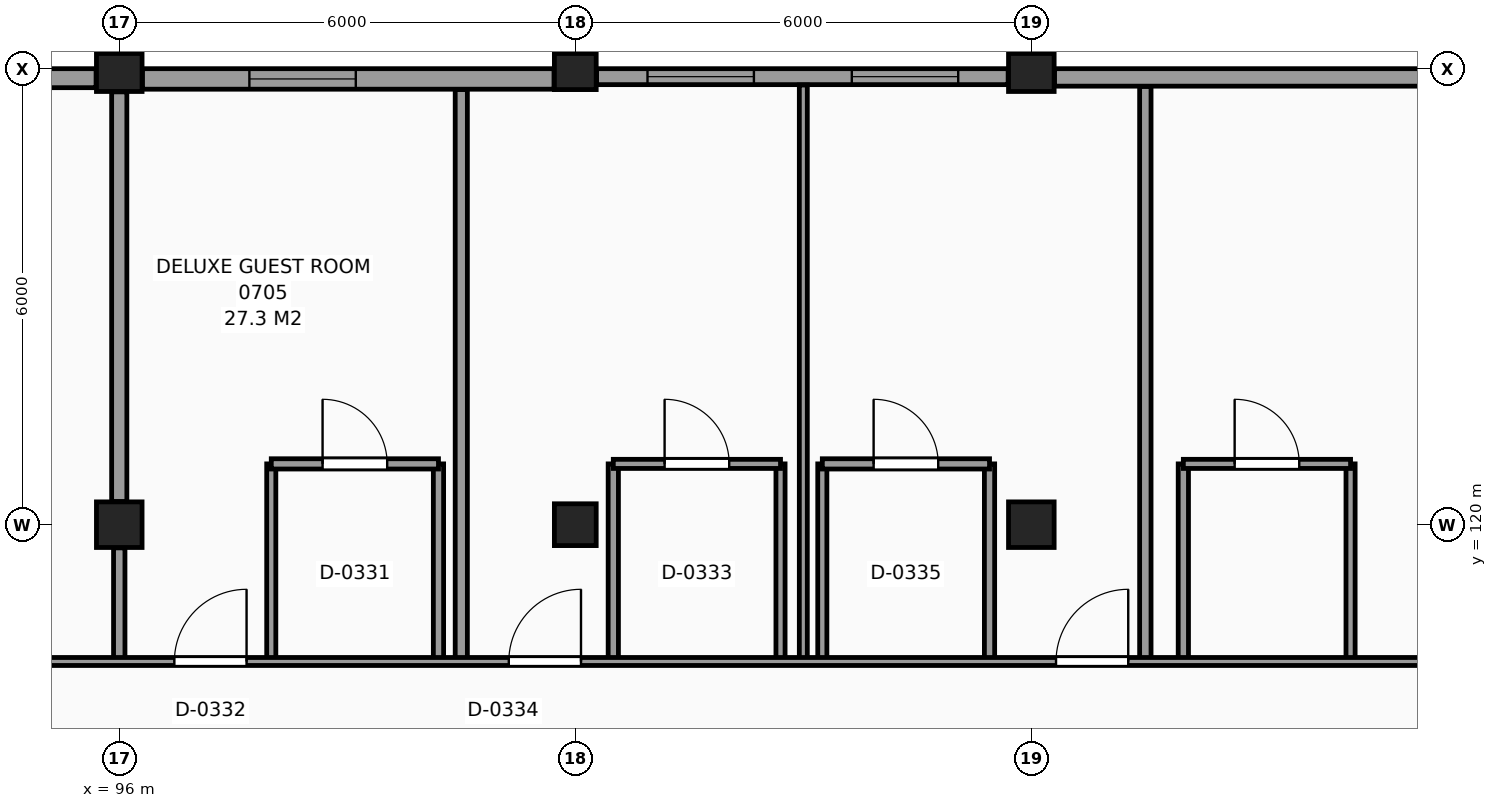
"""IFC4 building model, lengths in metres.
Left out: names, types, materials, properties, quantities, classifications, styles, units other than length and angle.
Written with IfcOpenShell. Run it as: python <this file> out.ifc"""

import sys

from ifc_helpers import new_model, si_unit, direction, frame, frame_2d, origin, origin_2d, place, context, subcontext, project, spatial, rectangle, extrude, element, fill, save


model = new_model("IFC4")
c1 = context("Model", 3, precision=1e-05, world=origin(), true_north=direction((0.0, 1.0)))
c2 = subcontext(c1, "Body", "Model", "MODEL_VIEW")
j1 = project(units=[si_unit("LENGTHUNIT", "METRE"), si_unit("PLANEANGLEUNIT", "RADIAN")], contexts=[c1])
p1 = place(None, origin())
s1 = spatial("IfcSite", under=j1, at=p1, CompositionType="ELEMENT")
p2 = place(p1, origin())
s2 = spatial("IfcBuilding", under=s1, at=p2, CompositionType="ELEMENT")
p3 = place(p2, frame((0.0, 0.0, 31.5)))
s3 = spatial("IfcBuildingStorey", under=s2, at=p3, CompositionType="ELEMENT", Elevation=31.5)
for number, where, z_axis, x_axis in (
    (1, (96.0, 120.0, 0.0), (0.0, 0.0, 1.0), (1.0, 0.0, 0.0)),
    (2, (96.0, 126.0, 0.0), (0.0, 0.0, 1.0), (1.0, 0.0, 0.0)),
):
    element("IfcColumn", number, at=place(p3, frame(where, z_axis=z_axis, x_axis=x_axis)), inside=s3, PredefinedType="COLUMN", context=c2, shape_type="SweptSolid", body=[
        extrude(rectangle(XDim=0.6, YDim=0.6, at=origin_2d()), origin(), (0.0, 0.0, 1.0), 3.3),
    ])
for number, where, z_axis, x_axis in (
    (3, (102.0, 120.0, 0.0), (0.0, 0.0, 1.0), (1.0, 0.0, 0.0)),
    (4, (102.0, 126.0, 0.0), (0.0, 0.0, 1.0), (1.0, 0.0, 0.0)),
):
    element("IfcColumn", number, at=place(p3, frame(where, z_axis=z_axis, x_axis=x_axis)), inside=s3, PredefinedType="COLUMN", context=c2, shape_type="SweptSolid", body=[
        extrude(rectangle(XDim=0.55, YDim=0.55, at=origin_2d()), origin(), (0.0, 0.0, 1.0), 3.3),
    ])
for number, where, z_axis, x_axis in (
    (5, (108.0, 120.0, 0.0), (0.0, 0.0, 1.0), (1.0, 0.0, 0.0)),
    (6, (108.0, 126.0, 0.0), (0.0, 0.0, 1.0), (1.0, 0.0, 0.0)),
):
    element("IfcColumn", number, at=place(p3, frame(where, z_axis=z_axis, x_axis=x_axis)), inside=s3, PredefinedType="COLUMN", context=c2, shape_type="SweptSolid", body=[
        extrude(rectangle(XDim=0.6, YDim=0.6, at=origin_2d()), origin(), (0.0, 0.0, 1.0), 3.3),
    ])
p4 = place(p3, frame((113.72, 125.885, 0.0), z_axis=(0.0, 0.0, 1.0), x_axis=(-1.0, 0.0, 0.0)))
e7 = element("IfcWall", 7, at=p4, inside=s3, PredefinedType="SOLIDWALL", context=c2, shape_type="SweptSolid", body=[
    extrude(rectangle(XDim=5.415, YDim=0.23, at=frame_2d((2.708, 0.0))), origin(), (0.0, 0.0, 1.0), 2.42),
])
p5 = place(p3, frame((107.695, 125.895, 0.0), z_axis=(0.0, 0.0, 1.0), x_axis=(-1.0, 0.0, 0.0)))
e8 = element("IfcWall", 8, at=p5, inside=s3, PredefinedType="SOLIDWALL", context=c2, shape_type="SweptSolid", body=[
    extrude(rectangle(XDim=5.415, YDim=0.21, at=frame_2d((2.708, 0.0))), origin(), (0.0, 0.0, 1.0), 2.42),
])
p6 = place(p5, frame((3.345, 0.0, 0.8)))
e9 = element("IfcOpeningElement", 9, at=p6, cuts=e8, PredefinedType="OPENING", context=c2, shape_type="SweptSolid", body=[
    extrude(rectangle(XDim=1.4, YDim=1.4, at=frame_2d((0.7, 0.7))), frame((0.0, 0.115, 0.0), z_axis=(0.0, -1.0, 0.0), x_axis=(1.0, 0.0, 0.0)), (0.0, 0.0, 1.0), 0.23),
])
p7 = place(p5, frame((0.657, 0.0, 0.8)))
e10 = element("IfcOpeningElement", 10, at=p7, cuts=e8, PredefinedType="OPENING", context=c2, shape_type="SweptSolid", body=[
    extrude(rectangle(XDim=1.4, YDim=1.4, at=frame_2d((0.7, 0.7))), frame((0.0, 0.115, 0.0), z_axis=(0.0, -1.0, 0.0), x_axis=(1.0, 0.0, 0.0)), (0.0, 0.0, 1.0), 0.23),
])
p8 = place(p3, frame((101.72, 125.865, 0.0), z_axis=(0.0, 0.0, 1.0), x_axis=(-1.0, 0.0, 0.0)))
e11 = element("IfcWall", 11, at=p8, inside=s3, PredefinedType="SOLIDWALL", context=c2, shape_type="SweptSolid", body=[
    extrude(rectangle(XDim=5.415, YDim=0.27, at=frame_2d((2.708, 0.0))), origin(), (0.0, 0.0, 1.0), 2.42),
])
p9 = place(p8, frame((2.608, 0.0, 0.8)))
e12 = element("IfcOpeningElement", 12, at=p9, cuts=e11, PredefinedType="OPENING", context=c2, shape_type="SweptSolid", body=[
    extrude(rectangle(XDim=1.4, YDim=1.4, at=frame_2d((0.7, 0.7))), frame((0.0, 0.145, 0.0), z_axis=(0.0, -1.0, 0.0), x_axis=(1.0, 0.0, 0.0)), (0.0, 0.0, 1.0), 0.29),
])
p10 = place(p3, frame((95.695, 125.875, 0.0), z_axis=(0.0, 0.0, 1.0), x_axis=(-1.0, 0.0, 0.0)))
e13 = element("IfcWall", 13, at=p10, inside=s3, PredefinedType="SOLIDWALL", context=c2, shape_type="SweptSolid", body=[
    extrude(rectangle(XDim=5.415, YDim=0.25, at=frame_2d((2.708, 0.0))), origin(), (0.0, 0.0, 1.0), 2.42),
])
p11 = place(p10, frame((2.007, 0.0, 0.8)))
e14 = element("IfcOpeningElement", 14, at=p11, cuts=e13, PredefinedType="OPENING", context=c2, shape_type="SweptSolid", body=[
    extrude(rectangle(XDim=1.4, YDim=1.4, at=frame_2d((0.7, 0.7))), frame((0.0, 0.135, 0.0), z_axis=(0.0, -1.0, 0.0), x_axis=(1.0, 0.0, 0.0)), (0.0, 0.0, 1.0), 0.27),
])
p12 = place(p3, frame((96.0, 118.2, 0.0), z_axis=(0.0, 0.0, 1.0), x_axis=(0.0, 1.0, 0.0)))
e15 = element("IfcWall", 15, at=p12, inside=s3, PredefinedType="PARTITIONING", context=c2, shape_type="SweptSolid", body=[
    extrude(rectangle(XDim=1.495, YDim=0.15, at=frame_2d((0.748, 0.0))), origin(), (0.0, 0.0, 1.0), 2.27),
])
p13 = place(p3, frame((96.0, 120.305, 0.0), z_axis=(0.0, 0.0, 1.0), x_axis=(0.0, 1.0, 0.0)))
e16 = element("IfcWall", 16, at=p13, inside=s3, PredefinedType="PARTITIONING", context=c2, shape_type="SweptSolid", body=[
    extrude(rectangle(XDim=5.39, YDim=0.2, at=frame_2d((2.695, 0.0))), origin(), (0.0, 0.0, 1.0), 2.27),
])
p14 = place(p3, frame((98.0, 118.2, 0.0), z_axis=(0.0, 0.0, 1.0), x_axis=(0.0, 1.0, 0.0)))
e17 = element("IfcWall", 17, at=p14, inside=s3, PredefinedType="PARTITIONING", context=c2, shape_type="SweptSolid", body=[
    extrude(rectangle(XDim=2.6, YDim=0.12, at=frame_2d((1.3, 0.0))), origin(), (0.0, 0.0, 1.0), 3.07),
])
p15 = place(p3, frame((100.2, 118.2, 0.0), z_axis=(0.0, 0.0, 1.0), x_axis=(0.0, 1.0, 0.0)))
e18 = element("IfcWall", 18, at=p15, inside=s3, PredefinedType="PARTITIONING", context=c2, shape_type="SweptSolid", body=[
    extrude(rectangle(XDim=2.6, YDim=0.135, at=frame_2d((1.3, 0.0))), origin(), (0.0, 0.0, 1.0), 3.07),
])
p16 = place(p3, frame((100.5, 118.2, 0.0), z_axis=(0.0, 0.0, 1.0), x_axis=(0.0, 1.0, 0.0)))
e19 = element("IfcWall", 19, at=p16, inside=s3, PredefinedType="PARTITIONING", context=c2, shape_type="SweptSolid", body=[
    extrude(rectangle(XDim=7.525, YDim=0.16, at=frame_2d((3.763, 0.0))), origin(), (0.0, 0.0, 1.0), 3.07),
])
p17 = place(p3, frame((102.5, 118.2, 0.0), z_axis=(0.0, 0.0, 1.0), x_axis=(0.0, 1.0, 0.0)))
e20 = element("IfcWall", 20, at=p17, inside=s3, PredefinedType="PARTITIONING", context=c2, shape_type="SweptSolid", body=[
    extrude(rectangle(XDim=2.6, YDim=0.135, at=frame_2d((1.3, 0.0))), origin(), (0.0, 0.0, 1.0), 3.07),
])
p18 = place(p3, frame((104.7, 118.2, 0.0), z_axis=(0.0, 0.0, 1.0), x_axis=(0.0, 1.0, 0.0)))
e21 = element("IfcWall", 21, at=p18, inside=s3, PredefinedType="PARTITIONING", context=c2, shape_type="SweptSolid", body=[
    extrude(rectangle(XDim=2.6, YDim=0.12, at=frame_2d((1.3, 0.0))), origin(), (0.0, 0.0, 1.0), 3.07),
])
p19 = place(p3, frame((105.0, 118.2, 0.0), z_axis=(0.0, 0.0, 1.0), x_axis=(0.0, 1.0, 0.0)))
e22 = element("IfcWall", 22, at=p19, inside=s3, PredefinedType="PARTITIONING", context=c2, shape_type="SweptSolid", body=[
    extrude(rectangle(XDim=7.585, YDim=0.105, at=frame_2d((3.792, 0.0))), origin(), (0.0, 0.0, 1.0), 3.07),
])
p20 = place(p3, frame((105.25, 118.2, 0.0), z_axis=(0.0, 0.0, 1.0), x_axis=(0.0, 1.0, 0.0)))
e23 = element("IfcWall", 23, at=p20, inside=s3, PredefinedType="PARTITIONING", context=c2, shape_type="SweptSolid", body=[
    extrude(rectangle(XDim=2.6, YDim=0.12, at=frame_2d((1.3, 0.0))), origin(), (0.0, 0.0, 1.0), 3.07),
])
p21 = place(p3, frame((107.45, 118.2, 0.0), z_axis=(0.0, 0.0, 1.0), x_axis=(0.0, 1.0, 0.0)))
e24 = element("IfcWall", 24, at=p21, inside=s3, PredefinedType="PARTITIONING", context=c2, shape_type="SweptSolid", body=[
    extrude(rectangle(XDim=2.6, YDim=0.135, at=frame_2d((1.3, 0.0))), origin(), (0.0, 0.0, 1.0), 3.07),
])
p22 = place(p3, frame((109.5, 118.2, 0.0), z_axis=(0.0, 0.0, 1.0), x_axis=(0.0, 1.0, 0.0)))
e25 = element("IfcWall", 25, at=p22, inside=s3, PredefinedType="PARTITIONING", context=c2, shape_type="SweptSolid", body=[
    extrude(rectangle(XDim=7.565, YDim=0.15, at=frame_2d((3.782, 0.0))), origin(), (0.0, 0.0, 1.0), 3.07),
])
p23 = place(p3, frame((110.0, 118.2, 0.0), z_axis=(0.0, 0.0, 1.0), x_axis=(0.0, 1.0, 0.0)))
e26 = element("IfcWall", 26, at=p23, inside=s3, PredefinedType="PARTITIONING", context=c2, shape_type="SweptSolid", body=[
    extrude(rectangle(XDim=2.6, YDim=0.135, at=frame_2d((1.3, 0.0))), origin(), (0.0, 0.0, 1.0), 3.07),
])
p24 = place(p3, frame((112.2, 118.2, 0.0), z_axis=(0.0, 0.0, 1.0), x_axis=(0.0, 1.0, 0.0)))
e27 = element("IfcWall", 27, at=p24, inside=s3, PredefinedType="PARTITIONING", context=c2, shape_type="SweptSolid", body=[
    extrude(rectangle(XDim=2.6, YDim=0.12, at=frame_2d((1.3, 0.0))), origin(), (0.0, 0.0, 1.0), 3.07),
])
p25 = place(p3, frame((66.215, 118.2, 0.0), z_axis=(0.0, 0.0, 1.0), x_axis=(1.0, 0.0, 0.0)))
e28 = element("IfcWall", 28, at=p25, inside=s3, PredefinedType="PARTITIONING", context=c2, shape_type="SweptSolid", body=[
    extrude(rectangle(XDim=110.285, YDim=0.105, at=frame_2d((55.143, 0.0))), origin(), (0.0, 0.0, 1.0), 3.07),
])
p26 = place(p25, frame((8.36, 0.0, 0.0)))
e29 = element("IfcOpeningElement", 29, at=p26, cuts=e28, PredefinedType="OPENING", context=c2, shape_type="SweptSolid", body=[
    extrude(rectangle(XDim=0.95, YDim=2.1, at=frame_2d((0.475, 1.05))), frame((0.0, 0.062, 0.0), z_axis=(0.0, -1.0, 0.0), x_axis=(1.0, 0.0, 0.0)), (0.0, 0.0, 1.0), 0.125),
])
p27 = place(p25, frame((12.51, 0.0, 0.0)))
e30 = element("IfcOpeningElement", 30, at=p27, cuts=e28, PredefinedType="OPENING", context=c2, shape_type="SweptSolid", body=[
    extrude(rectangle(XDim=0.95, YDim=2.1, at=frame_2d((0.475, 1.05))), frame((0.0, 0.062, 0.0), z_axis=(0.0, -1.0, 0.0), x_axis=(1.0, 0.0, 0.0)), (0.0, 0.0, 1.0), 0.125),
])
p28 = place(p25, frame((16.91, 0.0, 0.0)))
e31 = element("IfcOpeningElement", 31, at=p28, cuts=e28, PredefinedType="OPENING", context=c2, shape_type="SweptSolid", body=[
    extrude(rectangle(XDim=0.95, YDim=2.1, at=frame_2d((0.475, 1.05))), frame((0.0, 0.062, 0.0), z_axis=(0.0, -1.0, 0.0), x_axis=(1.0, 0.0, 0.0)), (0.0, 0.0, 1.0), 0.125),
])
p29 = place(p25, frame((21.41, 0.0, 0.0)))
e32 = element("IfcOpeningElement", 32, at=p29, cuts=e28, PredefinedType="OPENING", context=c2, shape_type="SweptSolid", body=[
    extrude(rectangle(XDim=0.95, YDim=2.1, at=frame_2d((0.475, 1.05))), frame((0.0, 0.062, 0.0), z_axis=(0.0, -1.0, 0.0), x_axis=(1.0, 0.0, 0.0)), (0.0, 0.0, 1.0), 0.125),
])
p30 = place(p25, frame((30.51, 0.0, 0.0)))
e33 = element("IfcOpeningElement", 33, at=p30, cuts=e28, PredefinedType="OPENING", context=c2, shape_type="SweptSolid", body=[
    extrude(rectangle(XDim=0.95, YDim=2.1, at=frame_2d((0.475, 1.05))), frame((0.0, 0.062, 0.0), z_axis=(0.0, -1.0, 0.0), x_axis=(1.0, 0.0, 0.0)), (0.0, 0.0, 1.0), 0.125),
])
p31 = place(p25, frame((34.91, 0.0, 0.0)))
e34 = element("IfcOpeningElement", 34, at=p31, cuts=e28, PredefinedType="OPENING", context=c2, shape_type="SweptSolid", body=[
    extrude(rectangle(XDim=0.95, YDim=2.1, at=frame_2d((0.475, 1.05))), frame((0.0, 0.062, 0.0), z_axis=(0.0, -1.0, 0.0), x_axis=(1.0, 0.0, 0.0)), (0.0, 0.0, 1.0), 0.125),
])
p32 = place(p25, frame((42.11, 0.0, 0.0)))
e35 = element("IfcOpeningElement", 35, at=p32, cuts=e28, PredefinedType="OPENING", context=c2, shape_type="SweptSolid", body=[
    extrude(rectangle(XDim=0.95, YDim=2.1, at=frame_2d((0.475, 1.05))), frame((0.0, 0.062, 0.0), z_axis=(0.0, -1.0, 0.0), x_axis=(1.0, 0.0, 0.0)), (0.0, 0.0, 1.0), 0.125),
])
p33 = place(p25, frame((50.36, 0.0, 0.0)))
e36 = element("IfcOpeningElement", 36, at=p33, cuts=e28, PredefinedType="OPENING", context=c2, shape_type="SweptSolid", body=[
    extrude(rectangle(XDim=0.95, YDim=2.1, at=frame_2d((0.475, 1.05))), frame((0.0, 0.062, 0.0), z_axis=(0.0, -1.0, 0.0), x_axis=(1.0, 0.0, 0.0)), (0.0, 0.0, 1.0), 0.125),
])
p34 = place(p25, frame((62.36, 0.0, 0.0)))
e37 = element("IfcOpeningElement", 37, at=p34, cuts=e28, PredefinedType="OPENING", context=c2, shape_type="SweptSolid", body=[
    extrude(rectangle(XDim=0.95, YDim=2.1, at=frame_2d((0.475, 1.05))), frame((0.0, 0.062, 0.0), z_axis=(0.0, -1.0, 0.0), x_axis=(1.0, 0.0, 0.0)), (0.0, 0.0, 1.0), 0.125),
])
p35 = place(p25, frame((64.91, 0.0, 0.0)))
e38 = element("IfcOpeningElement", 38, at=p35, cuts=e28, PredefinedType="OPENING", context=c2, shape_type="SweptSolid", body=[
    extrude(rectangle(XDim=0.95, YDim=2.1, at=frame_2d((0.475, 1.05))), frame((0.0, 0.062, 0.0), z_axis=(0.0, -1.0, 0.0), x_axis=(1.0, 0.0, 0.0)), (0.0, 0.0, 1.0), 0.125),
])
p36 = place(p25, frame((72.11, 0.0, 0.0)))
e39 = element("IfcOpeningElement", 39, at=p36, cuts=e28, PredefinedType="OPENING", context=c2, shape_type="SweptSolid", body=[
    extrude(rectangle(XDim=0.95, YDim=2.1, at=frame_2d((0.475, 1.05))), frame((0.0, 0.062, 0.0), z_axis=(0.0, -1.0, 0.0), x_axis=(1.0, 0.0, 0.0)), (0.0, 0.0, 1.0), 0.125),
])
p37 = place(p25, frame((76.31, 0.0, 0.0)))
e40 = element("IfcOpeningElement", 40, at=p37, cuts=e28, PredefinedType="OPENING", context=c2, shape_type="SweptSolid", body=[
    extrude(rectangle(XDim=0.95, YDim=2.1, at=frame_2d((0.475, 1.05))), frame((0.0, 0.062, 0.0), z_axis=(0.0, -1.0, 0.0), x_axis=(1.0, 0.0, 0.0)), (0.0, 0.0, 1.0), 0.125),
])
p38 = place(p25, frame((78.51, 0.0, 0.0)))
e41 = element("IfcOpeningElement", 41, at=p38, cuts=e28, PredefinedType="OPENING", context=c2, shape_type="SweptSolid", body=[
    extrude(rectangle(XDim=0.95, YDim=2.1, at=frame_2d((0.475, 1.05))), frame((0.0, 0.062, 0.0), z_axis=(0.0, -1.0, 0.0), x_axis=(1.0, 0.0, 0.0)), (0.0, 0.0, 1.0), 0.125),
])
p39 = place(p25, frame((84.51, 0.0, 0.0)))
e42 = element("IfcOpeningElement", 42, at=p39, cuts=e28, PredefinedType="OPENING", context=c2, shape_type="SweptSolid", body=[
    extrude(rectangle(XDim=0.95, YDim=2.1, at=frame_2d((0.475, 1.05))), frame((0.0, 0.062, 0.0), z_axis=(0.0, -1.0, 0.0), x_axis=(1.0, 0.0, 0.0)), (0.0, 0.0, 1.0), 0.125),
])
p40 = place(p25, frame((98.36, 0.0, 0.0)))
e43 = element("IfcOpeningElement", 43, at=p40, cuts=e28, PredefinedType="OPENING", context=c2, shape_type="SweptSolid", body=[
    extrude(rectangle(XDim=0.95, YDim=2.1, at=frame_2d((0.475, 1.05))), frame((0.0, 0.062, 0.0), z_axis=(0.0, -1.0, 0.0), x_axis=(1.0, 0.0, 0.0)), (0.0, 0.0, 1.0), 0.125),
])
p41 = place(p25, frame((104.26, 0.0, 0.0)))
e44 = element("IfcOpeningElement", 44, at=p41, cuts=e28, PredefinedType="OPENING", context=c2, shape_type="SweptSolid", body=[
    extrude(rectangle(XDim=0.95, YDim=2.1, at=frame_2d((0.475, 1.05))), frame((0.0, 0.062, 0.0), z_axis=(0.0, -1.0, 0.0), x_axis=(1.0, 0.0, 0.0)), (0.0, 0.0, 1.0), 0.125),
])
p42 = place(p3, frame((98.0, 120.8, 0.0), z_axis=(0.0, 0.0, 1.0), x_axis=(1.0, 0.0, 0.0)))
e45 = element("IfcWall", 45, at=p42, inside=s3, PredefinedType="PARTITIONING", context=c2, shape_type="SweptSolid", body=[
    extrude(rectangle(XDim=2.2, YDim=0.135, at=frame_2d((1.1, 0.0))), origin(), (0.0, 0.0, 1.0), 3.07),
])
p43 = place(p42, frame((0.675, 0.0, 0.0)))
e46 = element("IfcOpeningElement", 46, at=p43, cuts=e45, PredefinedType="OPENING", context=c2, shape_type="SweptSolid", body=[
    extrude(rectangle(XDim=0.85, YDim=2.1, at=frame_2d((0.425, 1.05))), frame((0.0, 0.078, 0.0), z_axis=(0.0, -1.0, 0.0), x_axis=(1.0, 0.0, 0.0)), (0.0, 0.0, 1.0), 0.155),
])
p44 = place(p3, frame((102.5, 120.8, 0.0), z_axis=(0.0, 0.0, 1.0), x_axis=(1.0, 0.0, 0.0)))
e47 = element("IfcWall", 47, at=p44, inside=s3, PredefinedType="PARTITIONING", context=c2, shape_type="SweptSolid", body=[
    extrude(rectangle(XDim=2.2, YDim=0.12, at=frame_2d((1.1, 0.0))), origin(), (0.0, 0.0, 1.0), 3.07),
])
p45 = place(p44, frame((0.675, 0.0, 0.0)))
e48 = element("IfcOpeningElement", 48, at=p45, cuts=e47, PredefinedType="OPENING", context=c2, shape_type="SweptSolid", body=[
    extrude(rectangle(XDim=0.85, YDim=2.1, at=frame_2d((0.425, 1.05))), frame((0.0, 0.07, 0.0), z_axis=(0.0, -1.0, 0.0), x_axis=(1.0, 0.0, 0.0)), (0.0, 0.0, 1.0), 0.14),
])
p46 = place(p3, frame((105.25, 120.8, 0.0), z_axis=(0.0, 0.0, 1.0), x_axis=(1.0, 0.0, 0.0)))
e49 = element("IfcWall", 49, at=p46, inside=s3, PredefinedType="PARTITIONING", context=c2, shape_type="SweptSolid", body=[
    extrude(rectangle(XDim=2.2, YDim=0.135, at=frame_2d((1.1, 0.0))), origin(), (0.0, 0.0, 1.0), 3.07),
])
p47 = place(p46, frame((0.675, 0.0, 0.0)))
e50 = element("IfcOpeningElement", 50, at=p47, cuts=e49, PredefinedType="OPENING", context=c2, shape_type="SweptSolid", body=[
    extrude(rectangle(XDim=0.85, YDim=2.1, at=frame_2d((0.425, 1.05))), frame((0.0, 0.078, 0.0), z_axis=(0.0, -1.0, 0.0), x_axis=(1.0, 0.0, 0.0)), (0.0, 0.0, 1.0), 0.155),
])
p48 = place(p3, frame((110.0, 120.8, 0.0), z_axis=(0.0, 0.0, 1.0), x_axis=(1.0, 0.0, 0.0)))
e51 = element("IfcWall", 51, at=p48, inside=s3, PredefinedType="PARTITIONING", context=c2, shape_type="SweptSolid", body=[
    extrude(rectangle(XDim=2.2, YDim=0.12, at=frame_2d((1.1, 0.0))), origin(), (0.0, 0.0, 1.0), 3.07),
])
p49 = place(p48, frame((0.675, 0.0, 0.0)))
e52 = element("IfcOpeningElement", 52, at=p49, cuts=e51, PredefinedType="OPENING", context=c2, shape_type="SweptSolid", body=[
    extrude(rectangle(XDim=0.85, YDim=2.1, at=frame_2d((0.425, 1.05))), frame((0.0, 0.07, 0.0), z_axis=(0.0, -1.0, 0.0), x_axis=(1.0, 0.0, 0.0)), (0.0, 0.0, 1.0), 0.14),
])
p50 = place(p9, origin())
e53 = element("IfcWindow", 53, at=p50, inside=s3, PartitioningType="SINGLE_PANEL", PredefinedType="WINDOW", context=c2, shape_type="SweptSolid", body=[
    extrude(rectangle(XDim=1.4, YDim=1.4, at=frame_2d((0.7, 0.7))), frame((0.0, 0.03, 0.0), z_axis=(0.0, -1.0, 0.0), x_axis=(1.0, 0.0, 0.0)), (0.0, 0.0, 1.0), 0.06),
])
fill(e12, e53)
p51 = place(p6, origin())
e54 = element("IfcWindow", 54, at=p51, inside=s3, PartitioningType="SINGLE_PANEL", PredefinedType="WINDOW", context=c2, shape_type="SweptSolid", body=[
    extrude(rectangle(XDim=1.4, YDim=1.4, at=frame_2d((0.7, 0.7))), frame((0.0, 0.03, 0.0), z_axis=(0.0, -1.0, 0.0), x_axis=(1.0, 0.0, 0.0)), (0.0, 0.0, 1.0), 0.06),
])
fill(e9, e54)
p52 = place(p7, origin())
e55 = element("IfcWindow", 55, at=p52, inside=s3, PartitioningType="SINGLE_PANEL", PredefinedType="WINDOW", context=c2, shape_type="SweptSolid", body=[
    extrude(rectangle(XDim=1.4, YDim=1.4, at=frame_2d((0.7, 0.7))), frame((0.0, 0.03, 0.0), z_axis=(0.0, -1.0, 0.0), x_axis=(1.0, 0.0, 0.0)), (0.0, 0.0, 1.0), 0.06),
])
fill(e10, e55)
p53 = place(p43, origin())
e56 = element("IfcDoor", 56, at=p53, inside=s3, OperationType="SINGLE_SWING_LEFT", PredefinedType="DOOR", context=c2, shape_type="SweptSolid", body=[
    extrude(rectangle(XDim=0.85, YDim=2.1, at=frame_2d((0.425, 1.05))), frame((0.0, 0.025, 0.0), z_axis=(0.0, -1.0, 0.0), x_axis=(1.0, 0.0, 0.0)), (0.0, 0.0, 1.0), 0.05),
])
fill(e46, e56)
p54 = place(p30, origin())
e57 = element("IfcDoor", 57, at=p54, inside=s3, OperationType="SINGLE_SWING_RIGHT", PredefinedType="DOOR", context=c2, shape_type="SweptSolid", body=[
    extrude(rectangle(XDim=0.95, YDim=2.1, at=frame_2d((0.475, 1.05))), frame((0.0, 0.025, 0.0), z_axis=(0.0, -1.0, 0.0), x_axis=(1.0, 0.0, 0.0)), (0.0, 0.0, 1.0), 0.05),
])
fill(e33, e57)
p55 = place(p45, origin())
e58 = element("IfcDoor", 58, at=p55, inside=s3, OperationType="SINGLE_SWING_LEFT", PredefinedType="DOOR", context=c2, shape_type="SweptSolid", body=[
    extrude(rectangle(XDim=0.85, YDim=2.1, at=frame_2d((0.425, 1.05))), frame((0.0, 0.025, 0.0), z_axis=(0.0, -1.0, 0.0), x_axis=(1.0, 0.0, 0.0)), (0.0, 0.0, 1.0), 0.05),
])
fill(e48, e58)
p56 = place(p31, origin())
e59 = element("IfcDoor", 59, at=p56, inside=s3, OperationType="SINGLE_SWING_RIGHT", PredefinedType="DOOR", context=c2, shape_type="SweptSolid", body=[
    extrude(rectangle(XDim=0.95, YDim=2.1, at=frame_2d((0.475, 1.05))), frame((0.0, 0.025, 0.0), z_axis=(0.0, -1.0, 0.0), x_axis=(1.0, 0.0, 0.0)), (0.0, 0.0, 1.0), 0.05),
])
fill(e34, e59)
p57 = place(p47, origin())
e60 = element("IfcDoor", 60, at=p57, inside=s3, OperationType="SINGLE_SWING_LEFT", PredefinedType="DOOR", context=c2, shape_type="SweptSolid", body=[
    extrude(rectangle(XDim=0.85, YDim=2.1, at=frame_2d((0.425, 1.05))), frame((0.0, 0.025, 0.0), z_axis=(0.0, -1.0, 0.0), x_axis=(1.0, 0.0, 0.0)), (0.0, 0.0, 1.0), 0.05),
])
fill(e50, e60)
p58 = place(p32, origin())
e61 = element("IfcDoor", 61, at=p58, inside=s3, OperationType="SINGLE_SWING_RIGHT", PredefinedType="DOOR", context=c2, shape_type="SweptSolid", body=[
    extrude(rectangle(XDim=0.95, YDim=2.1, at=frame_2d((0.475, 1.05))), frame((0.0, 0.025, 0.0), z_axis=(0.0, -1.0, 0.0), x_axis=(1.0, 0.0, 0.0)), (0.0, 0.0, 1.0), 0.05),
])
fill(e35, e61)
p59 = place(p49, origin())
e62 = element("IfcDoor", 62, at=p59, inside=s3, OperationType="SINGLE_SWING_LEFT", PredefinedType="DOOR", context=c2, shape_type="SweptSolid", body=[
    extrude(rectangle(XDim=0.85, YDim=2.1, at=frame_2d((0.425, 1.05))), frame((0.0, 0.025, 0.0), z_axis=(0.0, -1.0, 0.0), x_axis=(1.0, 0.0, 0.0)), (0.0, 0.0, 1.0), 0.05),
])
fill(e52, e62)
save(model, sys.argv[1])
